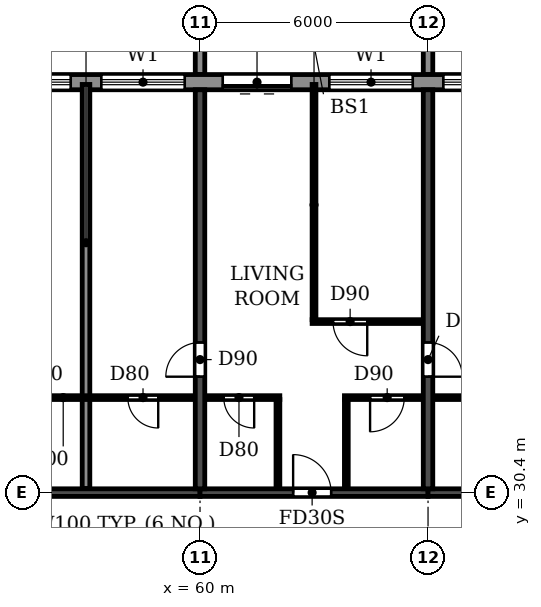
"""IFC4 building model, lengths in metres.
Left out: names, types, materials, properties, quantities, classifications, styles, units other than length and angle.
Written with IfcOpenShell. Run it as: python <this file> out.ifc"""

import sys

from ifc_helpers import new_model, si_unit, direction, frame, frame_2d, origin, place, context, subcontext, project, spatial, polyline, rectangle, outline, extrude, source, transform, mapped, element, fill, save


model = new_model("IFC4")
c1 = context("Model", 3, precision=1e-05, world=origin(), true_north=direction((0.0, 1.0)))
c2 = subcontext(c1, "Body", "Model", "MODEL_VIEW")
j1 = project(units=[si_unit("LENGTHUNIT", "METRE"), si_unit("PLANEANGLEUNIT", "RADIAN")], contexts=[c1])
p1 = place(None, origin())
s1 = spatial("IfcSite", under=j1, at=p1, CompositionType="ELEMENT")
p2 = place(p1, origin())
s2 = spatial("IfcBuilding", under=s1, at=p2, CompositionType="ELEMENT")
p3 = place(p2, frame((0.0, 0.0, 208.2)))
s3 = spatial("IfcBuildingStorey", under=s2, at=p3, CompositionType="ELEMENT", Elevation=208.2)
p4 = place(p3, frame((60.0, 30.5, 0.0), z_axis=(0.0, 0.0, 1.0), x_axis=(0.0, 1.0, 0.0)))
e1 = element("IfcWall", 1, at=p4, inside=s3, PredefinedType="SHEAR", context=c2, shape_type="SweptSolid", body=[
    extrude(rectangle(XDim=10.5, YDim=0.25, at=frame_2d((5.25, 0.0))), origin(), (0.0, 0.0, 1.0), 3.0),
])
p5 = place(p4, frame((2.95, 0.0, 0.0)))
e2 = element("IfcOpeningElement", 2, at=p5, cuts=e1, PredefinedType="OPENING", context=c2, shape_type="SweptSolid", body=[
    extrude(rectangle(XDim=0.9, YDim=2.1, at=frame_2d((0.45, 1.05))), frame((0.0, 0.135, 0.0), z_axis=(0.0, -1.0, 0.0), x_axis=(1.0, 0.0, 0.0)), (0.0, 0.0, 1.0), 0.27),
])
p6 = place(p3, frame((66.0, 30.5, 0.0), z_axis=(0.0, 0.0, 1.0), x_axis=(0.0, 1.0, 0.0)))
e3 = element("IfcWall", 3, at=p6, inside=s3, PredefinedType="SHEAR", context=c2, shape_type="SweptSolid", body=[
    extrude(rectangle(XDim=10.5, YDim=0.25, at=frame_2d((5.25, 0.0))), origin(), (0.0, 0.0, 1.0), 3.0),
])
p7 = place(p6, frame((2.95, 0.0, 0.0)))
e4 = element("IfcOpeningElement", 4, at=p7, cuts=e3, PredefinedType="OPENING", context=c2, shape_type="SweptSolid", body=[
    extrude(rectangle(XDim=0.9, YDim=2.1, at=frame_2d((0.45, 1.05))), frame((0.0, 0.135, 0.0), z_axis=(0.0, -1.0, 0.0), x_axis=(1.0, 0.0, 0.0)), (0.0, 0.0, 1.0), 0.27),
])
p8 = place(p3, frame((54.0, 30.4, 0.0), z_axis=(0.0, 0.0, 1.0), x_axis=(1.0, 0.0, 0.0)))
e5 = element("IfcWall", 5, at=p8, inside=s3, PredefinedType="SHEAR", context=c2, shape_type="SweptSolid", body=[
    extrude(rectangle(XDim=6.0, YDim=0.2, at=frame_2d((3.0, 0.0))), origin(), (0.0, 0.0, 1.0), 2.4),
])
p9 = place(p3, frame((60.0, 30.4, 0.0), z_axis=(0.0, 0.0, 1.0), x_axis=(1.0, 0.0, 0.0)))
e6 = element("IfcWall", 6, at=p9, inside=s3, PredefinedType="SHEAR", context=c2, shape_type="SweptSolid", body=[
    extrude(rectangle(XDim=6.0, YDim=0.2, at=frame_2d((3.0, 0.0))), origin(), (0.0, 0.0, 1.0), 2.4),
])
p10 = place(p9, frame((2.45, 0.0, 0.0)))
e7 = element("IfcOpeningElement", 7, at=p10, cuts=e6, PredefinedType="OPENING", context=c2, shape_type="SweptSolid", body=[
    extrude(rectangle(XDim=1.0, YDim=2.1, at=frame_2d((0.5, 1.05))), frame((0.0, 0.11, 0.0), z_axis=(0.0, -1.0, 0.0), x_axis=(1.0, 0.0, 0.0)), (0.0, 0.0, 1.0), 0.22),
])
p11 = place(p3, frame((66.0, 30.4, 0.0), z_axis=(0.0, 0.0, 1.0), x_axis=(1.0, 0.0, 0.0)))
e8 = element("IfcWall", 8, at=p11, inside=s3, PredefinedType="SHEAR", context=c2, shape_type="SweptSolid", body=[
    extrude(rectangle(XDim=6.0, YDim=0.2, at=frame_2d((3.0, 0.0))), origin(), (0.0, 0.0, 1.0), 2.4),
])
p12 = place(p3, frame((79.317, 41.2, 0.0), z_axis=(0.0, 0.0, 1.0), x_axis=(-1.0, 0.0, 0.0)))
e9 = element("IfcWall", 9, at=p12, inside=s3, PredefinedType="STANDARD", context=c2, shape_type="SweptSolid", body=[
    extrude(rectangle(XDim=56.634, YDim=0.4, at=frame_2d((28.317, 0.0))), origin(), (0.0, 0.0, 1.0), 3.0),
])
p13 = place(p12, frame((52.717, 0.0, 0.9)))
e10 = element("IfcOpeningElement", 10, at=p13, cuts=e9, PredefinedType="OPENING", context=c2, shape_type="SweptSolid", body=[
    extrude(rectangle(XDim=2.2, YDim=1.5, at=frame_2d((1.1, 0.75))), frame((0.0, 0.21, 0.0), z_axis=(0.0, -1.0, 0.0), x_axis=(1.0, 0.0, 0.0)), (0.0, 0.0, 1.0), 0.42),
])
p14 = place(p12, frame((49.917, 0.0, 0.0)))
e11 = element("IfcOpeningElement", 11, at=p14, cuts=e9, PredefinedType="OPENING", context=c2, shape_type="SweptSolid", body=[
    extrude(rectangle(XDim=1.8, YDim=2.4, at=frame_2d((0.9, 1.2))), frame((0.0, 0.21, 0.0), z_axis=(0.0, -1.0, 0.0), x_axis=(1.0, 0.0, 0.0)), (0.0, 0.0, 1.0), 0.42),
])
p15 = place(p12, frame((46.717, 0.0, 0.9)))
e12 = element("IfcOpeningElement", 12, at=p15, cuts=e9, PredefinedType="OPENING", context=c2, shape_type="SweptSolid", body=[
    extrude(rectangle(XDim=2.2, YDim=1.5, at=frame_2d((1.1, 0.75))), frame((0.0, 0.21, 0.0), z_axis=(0.0, -1.0, 0.0), x_axis=(1.0, 0.0, 0.0)), (0.0, 0.0, 1.0), 0.42),
])
p16 = place(p12, frame((43.917, 0.0, 0.0)))
e13 = element("IfcOpeningElement", 13, at=p16, cuts=e9, PredefinedType="OPENING", context=c2, shape_type="SweptSolid", body=[
    extrude(rectangle(XDim=1.8, YDim=2.4, at=frame_2d((0.9, 1.2))), frame((0.0, 0.21, 0.0), z_axis=(0.0, -1.0, 0.0), x_axis=(1.0, 0.0, 0.0)), (0.0, 0.0, 1.0), 0.42),
])
p17 = place(p12, frame((40.917, 0.0, 0.0)))
e14 = element("IfcOpeningElement", 14, at=p17, cuts=e9, PredefinedType="OPENING", context=c2, shape_type="SweptSolid", body=[
    extrude(rectangle(XDim=1.8, YDim=2.4, at=frame_2d((0.9, 1.2))), frame((0.0, 0.21, 0.0), z_axis=(0.0, -1.0, 0.0), x_axis=(1.0, 0.0, 0.0)), (0.0, 0.0, 1.0), 0.42),
])
p18 = place(p12, frame((37.717, 0.0, 0.9)))
e15 = element("IfcOpeningElement", 15, at=p18, cuts=e9, PredefinedType="OPENING", context=c2, shape_type="SweptSolid", body=[
    extrude(rectangle(XDim=2.2, YDim=1.5, at=frame_2d((1.1, 0.75))), frame((0.0, 0.21, 0.0), z_axis=(0.0, -1.0, 0.0), x_axis=(1.0, 0.0, 0.0)), (0.0, 0.0, 1.0), 0.42),
])
p19 = place(p12, frame((34.717, 0.0, 0.9)))
e16 = element("IfcOpeningElement", 16, at=p19, cuts=e9, PredefinedType="OPENING", context=c2, shape_type="SweptSolid", body=[
    extrude(rectangle(XDim=2.2, YDim=1.5, at=frame_2d((1.1, 0.75))), frame((0.0, 0.21, 0.0), z_axis=(0.0, -1.0, 0.0), x_axis=(1.0, 0.0, 0.0)), (0.0, 0.0, 1.0), 0.42),
])
p20 = place(p12, frame((31.717, 0.0, 0.9)))
e17 = element("IfcOpeningElement", 17, at=p20, cuts=e9, PredefinedType="OPENING", context=c2, shape_type="SweptSolid", body=[
    extrude(rectangle(XDim=2.2, YDim=1.5, at=frame_2d((1.1, 0.75))), frame((0.0, 0.21, 0.0), z_axis=(0.0, -1.0, 0.0), x_axis=(1.0, 0.0, 0.0)), (0.0, 0.0, 1.0), 0.42),
])
p21 = place(p12, frame((28.717, 0.0, 0.9)))
e18 = element("IfcOpeningElement", 18, at=p21, cuts=e9, PredefinedType="OPENING", context=c2, shape_type="SweptSolid", body=[
    extrude(rectangle(XDim=2.2, YDim=1.5, at=frame_2d((1.1, 0.75))), frame((0.0, 0.21, 0.0), z_axis=(0.0, -1.0, 0.0), x_axis=(1.0, 0.0, 0.0)), (0.0, 0.0, 1.0), 0.42),
])
p22 = place(p12, frame((25.917, 0.0, 0.0)))
e19 = element("IfcOpeningElement", 19, at=p22, cuts=e9, PredefinedType="OPENING", context=c2, shape_type="SweptSolid", body=[
    extrude(rectangle(XDim=1.8, YDim=2.4, at=frame_2d((0.9, 1.2))), frame((0.0, 0.21, 0.0), z_axis=(0.0, -1.0, 0.0), x_axis=(1.0, 0.0, 0.0)), (0.0, 0.0, 1.0), 0.42),
])
p23 = place(p12, frame((22.717, 0.0, 0.9)))
e20 = element("IfcOpeningElement", 20, at=p23, cuts=e9, PredefinedType="OPENING", context=c2, shape_type="SweptSolid", body=[
    extrude(rectangle(XDim=2.2, YDim=1.5, at=frame_2d((1.1, 0.75))), frame((0.0, 0.21, 0.0), z_axis=(0.0, -1.0, 0.0), x_axis=(1.0, 0.0, 0.0)), (0.0, 0.0, 1.0), 0.42),
])
p24 = place(p12, frame((19.717, 0.0, 0.9)))
e21 = element("IfcOpeningElement", 21, at=p24, cuts=e9, PredefinedType="OPENING", context=c2, shape_type="SweptSolid", body=[
    extrude(rectangle(XDim=2.2, YDim=1.5, at=frame_2d((1.1, 0.75))), frame((0.0, 0.21, 0.0), z_axis=(0.0, -1.0, 0.0), x_axis=(1.0, 0.0, 0.0)), (0.0, 0.0, 1.0), 0.42),
])
p25 = place(p12, frame((16.917, 0.0, 0.0)))
e22 = element("IfcOpeningElement", 22, at=p25, cuts=e9, PredefinedType="OPENING", context=c2, shape_type="SweptSolid", body=[
    extrude(rectangle(XDim=1.8, YDim=2.4, at=frame_2d((0.9, 1.2))), frame((0.0, 0.21, 0.0), z_axis=(0.0, -1.0, 0.0), x_axis=(1.0, 0.0, 0.0)), (0.0, 0.0, 1.0), 0.42),
])
p26 = place(p12, frame((13.717, 0.0, 0.9)))
e23 = element("IfcOpeningElement", 23, at=p26, cuts=e9, PredefinedType="OPENING", context=c2, shape_type="SweptSolid", body=[
    extrude(rectangle(XDim=2.2, YDim=1.5, at=frame_2d((1.1, 0.75))), frame((0.0, 0.21, 0.0), z_axis=(0.0, -1.0, 0.0), x_axis=(1.0, 0.0, 0.0)), (0.0, 0.0, 1.0), 0.42),
])
p27 = place(p12, frame((10.717, 0.0, 0.9)))
e24 = element("IfcOpeningElement", 24, at=p27, cuts=e9, PredefinedType="OPENING", context=c2, shape_type="SweptSolid", body=[
    extrude(rectangle(XDim=2.2, YDim=1.5, at=frame_2d((1.1, 0.75))), frame((0.0, 0.21, 0.0), z_axis=(0.0, -1.0, 0.0), x_axis=(1.0, 0.0, 0.0)), (0.0, 0.0, 1.0), 0.42),
])
p28 = place(p12, frame((7.717, 0.0, 0.9)))
e25 = element("IfcOpeningElement", 25, at=p28, cuts=e9, PredefinedType="OPENING", context=c2, shape_type="SweptSolid", body=[
    extrude(rectangle(XDim=2.2, YDim=1.5, at=frame_2d((1.1, 0.75))), frame((0.0, 0.21, 0.0), z_axis=(0.0, -1.0, 0.0), x_axis=(1.0, 0.0, 0.0)), (0.0, 0.0, 1.0), 0.42),
])
p29 = place(p12, frame((4.917, 0.0, 0.0)))
e26 = element("IfcOpeningElement", 26, at=p29, cuts=e9, PredefinedType="OPENING", context=c2, shape_type="SweptSolid", body=[
    extrude(rectangle(XDim=1.8, YDim=2.4, at=frame_2d((0.9, 1.2))), frame((0.0, 0.21, 0.0), z_axis=(0.0, -1.0, 0.0), x_axis=(1.0, 0.0, 0.0)), (0.0, 0.0, 1.0), 0.42),
])
p30 = place(p12, frame((1.717, 0.0, 0.9)))
e27 = element("IfcOpeningElement", 27, at=p30, cuts=e9, PredefinedType="OPENING", context=c2, shape_type="SweptSolid", body=[
    extrude(rectangle(XDim=2.2, YDim=1.5, at=frame_2d((1.1, 0.75))), frame((0.0, 0.21, 0.0), z_axis=(0.0, -1.0, 0.0), x_axis=(1.0, 0.0, 0.0)), (0.0, 0.0, 1.0), 0.42),
])
m1 = source(origin(), c2, "Body", "SweptSolid", [
    extrude(outline(polyline([(0.0, 0.0), (0.25, 0.0), (0.25, 3.1), (0.0, 3.1), (0.0, 0.0)])), origin(), (0.0, 0.0, 1.0), 3.1),
])
for number, where in (
    (28, (59.875, 41.4, 0.0)),
    (29, (65.875, 41.4, 0.0)),
):
    element("IfcWall", number, at=place(p3, frame(where)), inside=s3, PredefinedType="STANDARD", context=c2, shape_type="MappedRepresentation", body=[
        mapped(m1, transform((0.0, 0.0, 0.0))),
    ])
p31 = place(p3, frame((57.0, 30.51, 0.0), z_axis=(0.0, 0.0, 1.0), x_axis=(0.0, 1.0, 0.0)))
e30 = element("IfcWall", 30, at=p31, inside=s3, PredefinedType="PARTITIONING", context=c2, shape_type="SweptSolid", body=[
    extrude(rectangle(XDim=10.63, YDim=0.2, at=frame_2d((5.315, 0.0))), origin(), (0.0, 0.0, 1.0), 3.0),
])
p32 = place(p3, frame((54.135, 32.9, 0.0), z_axis=(0.0, 0.0, 1.0), x_axis=(1.0, 0.0, 0.0)))
e31 = element("IfcWall", 31, at=p32, inside=s3, PredefinedType="PARTITIONING", context=c2, shape_type="SweptSolid", body=[
    extrude(rectangle(XDim=5.73, YDim=0.1, at=frame_2d((2.865, 0.0))), origin(), (0.0, 0.0, 1.0), 3.0),
])
p33 = place(p32, frame((0.965, 0.0, 0.0)))
e32 = element("IfcOpeningElement", 32, at=p33, cuts=e31, PredefinedType="OPENING", context=c2, shape_type="SweptSolid", body=[
    extrude(rectangle(XDim=0.8, YDim=2.1, at=frame_2d((0.4, 1.05))), frame((0.0, 0.06, 0.0), z_axis=(0.0, -1.0, 0.0), x_axis=(1.0, 0.0, 0.0)), (0.0, 0.0, 1.0), 0.12),
])
p34 = place(p32, frame((3.965, 0.0, 0.0)))
e33 = element("IfcOpeningElement", 33, at=p34, cuts=e31, PredefinedType="OPENING", context=c2, shape_type="SweptSolid", body=[
    extrude(rectangle(XDim=0.8, YDim=2.1, at=frame_2d((0.4, 1.05))), frame((0.0, 0.06, 0.0), z_axis=(0.0, -1.0, 0.0), x_axis=(1.0, 0.0, 0.0)), (0.0, 0.0, 1.0), 0.12),
])
p35 = place(p3, frame((60.135, 32.9, 0.0), z_axis=(0.0, 0.0, 1.0), x_axis=(1.0, 0.0, 0.0)))
e34 = element("IfcWall", 34, at=p35, inside=s3, PredefinedType="PARTITIONING", context=c2, shape_type="SweptSolid", body=[
    extrude(rectangle(XDim=1.965, YDim=0.1, at=frame_2d((0.982, 0.0))), origin(), (0.0, 0.0, 1.0), 3.0),
])
p36 = place(p35, frame((0.49, 0.0, 0.0)))
e35 = element("IfcOpeningElement", 35, at=p36, cuts=e34, PredefinedType="OPENING", context=c2, shape_type="SweptSolid", body=[
    extrude(rectangle(XDim=0.8, YDim=2.1, at=frame_2d((0.4, 1.05))), frame((0.0, 0.06, 0.0), z_axis=(0.0, -1.0, 0.0), x_axis=(1.0, 0.0, 0.0)), (0.0, 0.0, 1.0), 0.12),
])
p37 = place(p3, frame((63.8, 32.9, 0.0), z_axis=(0.0, 0.0, 1.0), x_axis=(1.0, 0.0, 0.0)))
e36 = element("IfcWall", 36, at=p37, inside=s3, PredefinedType="PARTITIONING", context=c2, shape_type="SweptSolid", body=[
    extrude(rectangle(XDim=2.065, YDim=0.1, at=frame_2d((1.032, 0.0))), origin(), (0.0, 0.0, 1.0), 3.0),
])
p38 = place(p37, frame((0.675, 0.0, 0.0)))
e37 = element("IfcOpeningElement", 37, at=p38, cuts=e36, PredefinedType="OPENING", context=c2, shape_type="SweptSolid", body=[
    extrude(rectangle(XDim=0.9, YDim=2.1, at=frame_2d((0.45, 1.05))), frame((0.0, 0.06, 0.0), z_axis=(0.0, -1.0, 0.0), x_axis=(1.0, 0.0, 0.0)), (0.0, 0.0, 1.0), 0.12),
])
p39 = place(p3, frame((66.135, 32.9, 0.0), z_axis=(0.0, 0.0, 1.0), x_axis=(1.0, 0.0, 0.0)))
e38 = element("IfcWall", 38, at=p39, inside=s3, PredefinedType="PARTITIONING", context=c2, shape_type="SweptSolid", body=[
    extrude(rectangle(XDim=2.765, YDim=0.1, at=frame_2d((1.382, 0.0))), origin(), (0.0, 0.0, 1.0), 3.0),
])
p40 = place(p39, frame((0.965, 0.0, 0.0)))
e39 = element("IfcOpeningElement", 39, at=p40, cuts=e38, PredefinedType="OPENING", context=c2, shape_type="SweptSolid", body=[
    extrude(rectangle(XDim=0.8, YDim=2.1, at=frame_2d((0.4, 1.05))), frame((0.0, 0.06, 0.0), z_axis=(0.0, -1.0, 0.0), x_axis=(1.0, 0.0, 0.0)), (0.0, 0.0, 1.0), 0.12),
])
p41 = place(p3, frame((62.95, 34.9, 0.0), z_axis=(0.0, 0.0, 1.0), x_axis=(1.0, 0.0, 0.0)))
e40 = element("IfcWall", 40, at=p41, inside=s3, PredefinedType="PARTITIONING", context=c2, shape_type="SweptSolid", body=[
    extrude(rectangle(XDim=2.915, YDim=0.1, at=frame_2d((1.458, 0.0))), origin(), (0.0, 0.0, 1.0), 3.0),
])
p42 = place(p41, frame((0.55, 0.0, 0.0)))
e41 = element("IfcOpeningElement", 41, at=p42, cuts=e40, PredefinedType="OPENING", context=c2, shape_type="SweptSolid", body=[
    extrude(rectangle(XDim=0.9, YDim=2.1, at=frame_2d((0.45, 1.05))), frame((0.0, 0.06, 0.0), z_axis=(0.0, -1.0, 0.0), x_axis=(1.0, 0.0, 0.0)), (0.0, 0.0, 1.0), 0.12),
])
p43 = place(p3, frame((62.05, 30.51, 0.0), z_axis=(0.0, 0.0, 1.0), x_axis=(0.0, 1.0, 0.0)))
e42 = element("IfcWall", 42, at=p43, inside=s3, PredefinedType="PARTITIONING", context=c2, shape_type="SweptSolid", body=[
    extrude(rectangle(XDim=2.34, YDim=0.1, at=frame_2d((1.17, 0.0))), origin(), (0.0, 0.0, 1.0), 3.0),
])
p44 = place(p3, frame((63.0, 34.95, 0.0), z_axis=(0.0, 0.0, 1.0), x_axis=(0.0, 1.0, 0.0)))
e43 = element("IfcWall", 43, at=p44, inside=s3, PredefinedType="PARTITIONING", context=c2, shape_type="SweptSolid", body=[
    extrude(rectangle(XDim=6.19, YDim=0.1, at=frame_2d((3.095, 0.0))), origin(), (0.0, 0.0, 1.0), 3.0),
])
p45 = place(p3, frame((63.85, 30.51, 0.0), z_axis=(0.0, 0.0, 1.0), x_axis=(0.0, 1.0, 0.0)))
e44 = element("IfcWall", 44, at=p45, inside=s3, PredefinedType="PARTITIONING", context=c2, shape_type="SweptSolid", body=[
    extrude(rectangle(XDim=2.34, YDim=0.1, at=frame_2d((1.17, 0.0))), origin(), (0.0, 0.0, 1.0), 3.0),
])
p46 = place(p23, origin())
e45 = element("IfcWindow", 45, at=p46, inside=s3, PartitioningType="DOUBLE_PANEL_HORIZONTAL", PredefinedType="WINDOW", context=c2, shape_type="SweptSolid", body=[
    extrude(rectangle(XDim=2.2, YDim=1.5, at=frame_2d((1.1, 0.75))), frame((0.0, 0.03, 0.0), z_axis=(0.0, -1.0, 0.0), x_axis=(1.0, 0.0, 0.0)), (0.0, 0.0, 1.0), 0.06),
])
fill(e20, e45)
p47 = place(p24, origin())
e46 = element("IfcWindow", 46, at=p47, inside=s3, PartitioningType="DOUBLE_PANEL_HORIZONTAL", PredefinedType="WINDOW", context=c2, shape_type="SweptSolid", body=[
    extrude(rectangle(XDim=2.2, YDim=1.5, at=frame_2d((1.1, 0.75))), frame((0.0, 0.03, 0.0), z_axis=(0.0, -1.0, 0.0), x_axis=(1.0, 0.0, 0.0)), (0.0, 0.0, 1.0), 0.06),
])
fill(e21, e46)
p48 = place(p25, origin())
e47 = element("IfcDoor", 47, at=p48, inside=s3, OperationType="DOUBLE_DOOR_SLIDING", PredefinedType="DOOR", context=c2, shape_type="SweptSolid", body=[
    extrude(rectangle(XDim=1.8, YDim=2.4, at=frame_2d((0.9, 1.2))), frame((0.0, 0.025, 0.0), z_axis=(0.0, -1.0, 0.0), x_axis=(1.0, 0.0, 0.0)), (0.0, 0.0, 1.0), 0.05),
])
fill(e22, e47)
p49 = place(p26, origin())
e48 = element("IfcWindow", 48, at=p49, inside=s3, PartitioningType="DOUBLE_PANEL_HORIZONTAL", PredefinedType="WINDOW", context=c2, shape_type="SweptSolid", body=[
    extrude(rectangle(XDim=2.2, YDim=1.5, at=frame_2d((1.1, 0.75))), frame((0.0, 0.03, 0.0), z_axis=(0.0, -1.0, 0.0), x_axis=(1.0, 0.0, 0.0)), (0.0, 0.0, 1.0), 0.06),
])
fill(e23, e48)
p50 = place(p27, origin())
e49 = element("IfcWindow", 49, at=p50, inside=s3, PartitioningType="DOUBLE_PANEL_HORIZONTAL", PredefinedType="WINDOW", context=c2, shape_type="SweptSolid", body=[
    extrude(rectangle(XDim=2.2, YDim=1.5, at=frame_2d((1.1, 0.75))), frame((0.0, 0.03, 0.0), z_axis=(0.0, -1.0, 0.0), x_axis=(1.0, 0.0, 0.0)), (0.0, 0.0, 1.0), 0.06),
])
fill(e24, e49)
p51 = place(p34, frame((0.8, 0.0, 0.0), z_axis=(0.0, 0.0, 1.0), x_axis=(-1.0, 0.0, 0.0)))
e50 = element("IfcDoor", 50, at=p51, inside=s3, OperationType="SINGLE_SWING_LEFT", PredefinedType="DOOR", context=c2, shape_type="SweptSolid", body=[
    extrude(rectangle(XDim=0.8, YDim=2.1, at=frame_2d((0.4, 1.05))), frame((0.0, 0.025, 0.0), z_axis=(0.0, -1.0, 0.0), x_axis=(1.0, 0.0, 0.0)), (0.0, 0.0, 1.0), 0.05),
])
fill(e33, e50)
p52 = place(p5, origin())
e51 = element("IfcDoor", 51, at=p52, inside=s3, OperationType="SINGLE_SWING_LEFT", PredefinedType="DOOR", context=c2, shape_type="SweptSolid", body=[
    extrude(rectangle(XDim=0.9, YDim=2.1, at=frame_2d((0.45, 1.05))), frame((0.0, 0.025, 0.0), z_axis=(0.0, -1.0, 0.0), x_axis=(1.0, 0.0, 0.0)), (0.0, 0.0, 1.0), 0.05),
])
fill(e2, e51)
p53 = place(p36, frame((0.8, 0.0, 0.0), z_axis=(0.0, 0.0, 1.0), x_axis=(-1.0, 0.0, 0.0)))
e52 = element("IfcDoor", 52, at=p53, inside=s3, OperationType="SINGLE_SWING_LEFT", PredefinedType="DOOR", context=c2, shape_type="SweptSolid", body=[
    extrude(rectangle(XDim=0.8, YDim=2.1, at=frame_2d((0.4, 1.05))), frame((0.0, 0.025, 0.0), z_axis=(0.0, -1.0, 0.0), x_axis=(1.0, 0.0, 0.0)), (0.0, 0.0, 1.0), 0.05),
])
fill(e35, e52)
p54 = place(p10, origin())
e53 = element("IfcDoor", 53, at=p54, inside=s3, OperationType="SINGLE_SWING_LEFT", PredefinedType="DOOR", context=c2, shape_type="SweptSolid", body=[
    extrude(rectangle(XDim=1.0, YDim=2.1, at=frame_2d((0.5, 1.05))), frame((0.0, 0.025, 0.0), z_axis=(0.0, -1.0, 0.0), x_axis=(1.0, 0.0, 0.0)), (0.0, 0.0, 1.0), 0.05),
])
fill(e7, e53)
p55 = place(p42, frame((0.9, 0.0, 0.0), z_axis=(0.0, 0.0, 1.0), x_axis=(-1.0, 0.0, 0.0)))
e54 = element("IfcDoor", 54, at=p55, inside=s3, OperationType="SINGLE_SWING_LEFT", PredefinedType="DOOR", context=c2, shape_type="SweptSolid", body=[
    extrude(rectangle(XDim=0.9, YDim=2.1, at=frame_2d((0.45, 1.05))), frame((0.0, 0.025, 0.0), z_axis=(0.0, -1.0, 0.0), x_axis=(1.0, 0.0, 0.0)), (0.0, 0.0, 1.0), 0.05),
])
fill(e41, e54)
p56 = place(p38, frame((0.9, 0.0, 0.0), z_axis=(0.0, 0.0, 1.0), x_axis=(-1.0, 0.0, 0.0)))
e55 = element("IfcDoor", 55, at=p56, inside=s3, OperationType="SINGLE_SWING_RIGHT", PredefinedType="DOOR", context=c2, shape_type="SweptSolid", body=[
    extrude(rectangle(XDim=0.9, YDim=2.1, at=frame_2d((0.45, 1.05))), frame((0.0, 0.025, 0.0), z_axis=(0.0, -1.0, 0.0), x_axis=(1.0, 0.0, 0.0)), (0.0, 0.0, 1.0), 0.05),
])
fill(e37, e55)
p57 = place(p7, frame((0.9, 0.0, 0.0), z_axis=(0.0, 0.0, 1.0), x_axis=(-1.0, 0.0, 0.0)))
e56 = element("IfcDoor", 56, at=p57, inside=s3, OperationType="SINGLE_SWING_RIGHT", PredefinedType="DOOR", context=c2, shape_type="SweptSolid", body=[
    extrude(rectangle(XDim=0.9, YDim=2.1, at=frame_2d((0.45, 1.05))), frame((0.0, 0.025, 0.0), z_axis=(0.0, -1.0, 0.0), x_axis=(1.0, 0.0, 0.0)), (0.0, 0.0, 1.0), 0.05),
])
fill(e4, e56)
save(model, sys.argv[1])
